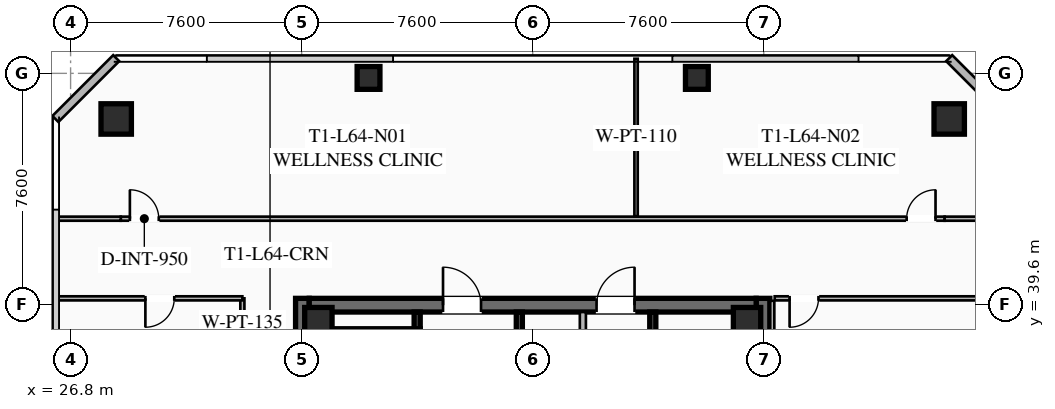
"""IFC4 building model, lengths in metres.
Left out: names, types, materials, properties, quantities, classifications, styles, units other than length and angle.
Written with IfcOpenShell. Run it as: python <this file> out.ifc"""

import sys

from ifc_helpers import new_model, si_unit, direction, frame, frame_2d, origin, origin_2d, place, context, subcontext, project, spatial, rectangle, hollow_rectangle, extrude, element, fill, save


model = new_model("IFC4")
c1 = context("Model", 3, precision=1e-05, world=origin(), true_north=direction((0.0, 1.0)))
c2 = subcontext(c1, "Body", "Model", "MODEL_VIEW")
j1 = project(units=[si_unit("LENGTHUNIT", "METRE"), si_unit("PLANEANGLEUNIT", "RADIAN")], contexts=[c1])
p1 = place(None, origin())
s1 = spatial("IfcSite", under=j1, at=p1, CompositionType="ELEMENT")
p2 = place(p1, origin())
s2 = spatial("IfcBuilding", under=s1, at=p2, CompositionType="ELEMENT")
p3 = place(p2, frame((0.0, 0.0, 236.15)))
s3 = spatial("IfcBuildingStorey", under=s2, at=p3, CompositionType="ELEMENT", Elevation=236.15)
for number, where, z_axis, x_axis in (
    (1, (34.425, 24.2, 0.0), (0.0, 0.0, 1.0), (0.0, 1.0, 0.0)),
    (2, (49.575, 39.8, 0.0), (0.0, 0.0, 1.0), (0.0, -1.0, 0.0)),
):
    element("IfcWall", number, at=place(p3, frame(where, z_axis=z_axis, x_axis=x_axis)), inside=s3, PredefinedType="SHEAR", context=c2, shape_type="SweptSolid", body=[
        extrude(rectangle(XDim=15.6, YDim=0.45, at=frame_2d((7.8, 0.0))), origin(), (0.0, 0.0, 1.0), 3.55),
    ])
p4 = place(p3, frame((34.65, 39.575, 0.0), z_axis=(0.0, 0.0, 1.0), x_axis=(1.0, 0.0, 0.0)))
e3 = element("IfcWall", 3, at=p4, inside=s3, PredefinedType="SHEAR", context=c2, shape_type="SweptSolid", body=[
    extrude(rectangle(XDim=14.7, YDim=0.45, at=frame_2d((7.35, 0.0))), origin(), (0.0, 0.0, 1.0), 3.55),
])
p5 = place(p4, frame((4.4, 0.0, 0.0)))
e4 = element("IfcOpeningElement", 4, at=p5, cuts=e3, PredefinedType="OPENING", context=c2, shape_type="SweptSolid", body=[
    extrude(rectangle(XDim=1.25, YDim=2.25, at=frame_2d((0.625, 1.125))), frame((0.0, 0.235, 0.0), z_axis=(0.0, -1.0, 0.0), x_axis=(1.0, 0.0, 0.0)), (0.0, 0.0, 1.0), 0.47),
])
p6 = place(p4, frame((9.45, 0.0, 0.0)))
e5 = element("IfcOpeningElement", 5, at=p6, cuts=e3, PredefinedType="OPENING", context=c2, shape_type="SweptSolid", body=[
    extrude(rectangle(XDim=1.25, YDim=2.25, at=frame_2d((0.625, 1.125))), frame((0.0, 0.235, 0.0), z_axis=(0.0, -1.0, 0.0), x_axis=(1.0, 0.0, 0.0)), (0.0, 0.0, 1.0), 0.47),
])
for number, where, z_axis, x_axis in (
    (6, (49.05, 39.05, 0.0), (0.0, 0.0, 1.0), (1.0, 0.0, 0.0)),
    (7, (34.95, 39.05, 0.0), (0.0, 0.0, 1.0), (1.0, 0.0, 0.0)),
):
    element("IfcColumn", number, at=place(p3, frame(where, z_axis=z_axis, x_axis=x_axis)), inside=s3, PredefinedType="COLUMN", context=c2, shape_type="SweptSolid", body=[
        extrude(hollow_rectangle(XDim=0.9, YDim=0.9, WallThickness=0.04, at=origin_2d()), origin(), (0.0, 0.0, 1.0), 3.37),
    ])
for number, where, z_axis, x_axis in (
    (8, (55.7, 45.7, 0.0), (0.0, 0.0, 1.0), (1.0, 0.0, 0.0)),
    (9, (28.3, 45.7, 0.0), (0.0, 0.0, 1.0), (1.0, 0.0, 0.0)),
):
    element("IfcColumn", number, at=place(p3, frame(where, z_axis=z_axis, x_axis=x_axis)), inside=s3, PredefinedType="COLUMN", context=c2, shape_type="SweptSolid", body=[
        extrude(hollow_rectangle(XDim=1.0, YDim=1.0, WallThickness=0.04, at=origin_2d()), origin(), (0.0, 0.0, 1.0), 3.37),
    ])
for number, where, z_axis, x_axis in (
    (10, (47.4, 47.05, 0.0), (0.0, 0.0, 1.0), (1.0, 0.0, 0.0)),
    (11, (36.6, 47.05, 0.0), (0.0, 0.0, 1.0), (1.0, 0.0, 0.0)),
):
    element("IfcColumn", number, at=place(p3, frame(where, z_axis=z_axis, x_axis=x_axis)), inside=s3, PredefinedType="COLUMN", context=c2, shape_type="SweptSolid", body=[
        extrude(hollow_rectangle(XDim=0.75, YDim=0.75, WallThickness=0.032, at=origin_2d()), origin(), (0.0, 0.0, 1.0), 3.37),
    ])
for number, where, z_axis, x_axis in (
    (12, (26.3, 45.7, 0.0), (0.0, 0.0, 1.0), (0.707, 0.707, 0.0)),
    (13, (55.7, 47.7, 0.0), (0.0, 0.0, 1.0), (0.707, -0.707, 0.0)),
):
    element("IfcWall", number, at=place(p3, frame(where, z_axis=z_axis, x_axis=x_axis)), inside=s3, PredefinedType="SOLIDWALL", context=c2, shape_type="SweptSolid", body=[
        extrude(rectangle(XDim=2.828, YDim=0.28, at=frame_2d((1.414, 0.0))), origin(), (0.0, 0.0, 1.0), 3.37),
    ])
p7 = place(p3, frame((38.2, 31.2, 0.0), z_axis=(0.0, 0.0, 1.0), x_axis=(0.0, 1.0, 0.0)))
e14 = element("IfcWall", 14, at=p7, inside=s3, PredefinedType="SHEAR", context=c2, shape_type="SweptSolid", body=[
    extrude(rectangle(XDim=8.15, YDim=0.2, at=frame_2d((4.075, 0.0))), origin(), (0.0, 0.0, 1.0), 3.37),
])
p8 = place(p7, frame((0.45, 0.0, 0.0)))
e15 = element("IfcOpeningElement", 15, at=p8, cuts=e14, PredefinedType="OPENING", context=c2, shape_type="SweptSolid", body=[
    extrude(rectangle(XDim=1.15, YDim=2.2, at=frame_2d((0.575, 1.1))), frame((0.0, 0.11, 0.0), z_axis=(0.0, -1.0, 0.0), x_axis=(1.0, 0.0, 0.0)), (0.0, 0.0, 1.0), 0.22),
])
p9 = place(p3, frame((41.56, 24.65, 0.0), z_axis=(0.0, 0.0, 1.0), x_axis=(0.0, 1.0, 0.0)))
e16 = element("IfcWall", 16, at=p9, inside=s3, PredefinedType="SHEAR", context=c2, shape_type="SweptSolid", body=[
    extrude(rectangle(XDim=14.7, YDim=0.2, at=frame_2d((7.35, 0.0))), origin(), (0.0, 0.0, 1.0), 3.37),
])
p10 = place(p3, frame((45.95, 39.35, 0.0), z_axis=(0.0, 0.0, 1.0), x_axis=(0.0, -1.0, 0.0)))
e17 = element("IfcWall", 17, at=p10, inside=s3, PredefinedType="SHEAR", context=c2, shape_type="SweptSolid", body=[
    extrude(rectangle(XDim=6.55, YDim=0.2, at=frame_2d((3.275, 0.0))), origin(), (0.0, 0.0, 1.0), 3.37),
])
p11 = place(p10, frame((5.075, 0.0, 0.0)))
e18 = element("IfcOpeningElement", 18, at=p11, cuts=e17, PredefinedType="OPENING", context=c2, shape_type="SweptSolid", body=[
    extrude(rectangle(XDim=1.1, YDim=2.2, at=frame_2d((0.55, 1.1))), frame((0.0, 0.11, 0.0), z_axis=(0.0, -1.0, 0.0), x_axis=(1.0, 0.0, 0.0)), (0.0, 0.0, 1.0), 0.22),
])
p12 = place(p10, frame((3.025, 0.0, 0.0)))
e19 = element("IfcOpeningElement", 19, at=p12, cuts=e17, PredefinedType="OPENING", context=c2, shape_type="SweptSolid", body=[
    extrude(rectangle(XDim=1.1, YDim=2.2, at=frame_2d((0.55, 1.1))), frame((0.0, 0.11, 0.0), z_axis=(0.0, -1.0, 0.0), x_axis=(1.0, 0.0, 0.0)), (0.0, 0.0, 1.0), 0.22),
])
p13 = place(p10, frame((1.025, 0.0, 0.0)))
e20 = element("IfcOpeningElement", 20, at=p13, cuts=e17, PredefinedType="OPENING", context=c2, shape_type="SweptSolid", body=[
    extrude(rectangle(XDim=1.1, YDim=2.2, at=frame_2d((0.55, 1.1))), frame((0.0, 0.11, 0.0), z_axis=(0.0, -1.0, 0.0), x_axis=(1.0, 0.0, 0.0)), (0.0, 0.0, 1.0), 0.22),
])
p14 = place(p3, frame((43.65, 32.35, 0.0), z_axis=(0.0, 0.0, 1.0), x_axis=(0.0, 1.0, 0.0)))
e21 = element("IfcWall", 21, at=p14, inside=s3, PredefinedType="SOLIDWALL", context=c2, shape_type="SweptSolid", body=[
    extrude(rectangle(XDim=7.0, YDim=0.2, at=frame_2d((3.5, 0.0))), origin(), (0.0, 0.0, 1.0), 2.723),
])
p15 = place(p14, frame((0.85, 0.0, 0.0)))
e22 = element("IfcOpeningElement", 22, at=p15, cuts=e21, PredefinedType="OPENING", context=c2, shape_type="SweptSolid", body=[
    extrude(rectangle(XDim=0.95, YDim=2.05, at=frame_2d((0.475, 1.025))), frame((0.0, 0.11, 0.0), z_axis=(0.0, -1.0, 0.0), x_axis=(1.0, 0.0, 0.0)), (0.0, 0.0, 1.0), 0.22),
])
p16 = place(p14, frame((4.85, 0.0, 0.0)))
e23 = element("IfcOpeningElement", 23, at=p16, cuts=e21, PredefinedType="OPENING", context=c2, shape_type="SweptSolid", body=[
    extrude(rectangle(XDim=0.95, YDim=2.05, at=frame_2d((0.475, 1.025))), frame((0.0, 0.11, 0.0), z_axis=(0.0, -1.0, 0.0), x_axis=(1.0, 0.0, 0.0)), (0.0, 0.0, 1.0), 0.22),
])
p17 = place(p3, frame((32.45, 35.4, 0.0), z_axis=(0.0, 0.0, 1.0), x_axis=(0.0, 1.0, 0.0)))
e24 = element("IfcWall", 24, at=p17, inside=s3, PredefinedType="PARTITIONING", context=c2, shape_type="SweptSolid", body=[
    extrude(rectangle(XDim=4.4, YDim=0.135, at=frame_2d((2.2, 0.0))), origin(), (0.0, 0.0, 1.0), 2.723),
])
p18 = place(p3, frame((28.45, 42.42, 0.0), z_axis=(0.0, 0.0, 1.0), x_axis=(1.0, 0.0, 0.0)))
e25 = element("IfcWall", 25, at=p18, inside=s3, PredefinedType="PARTITIONING", context=c2, shape_type="SweptSolid", body=[
    extrude(rectangle(XDim=27.1, YDim=0.135, at=frame_2d((13.55, 0.0))), origin(), (0.0, 0.0, 1.0), 2.723),
])
p19 = place(p18, frame((0.3, 0.0, 0.0)))
e26 = element("IfcOpeningElement", 26, at=p19, cuts=e25, PredefinedType="OPENING", context=c2, shape_type="SweptSolid", body=[
    extrude(rectangle(XDim=0.95, YDim=2.05, at=frame_2d((0.475, 1.025))), frame((0.0, 0.077, 0.0), z_axis=(0.0, -1.0, 0.0), x_axis=(1.0, 0.0, 0.0)), (0.0, 0.0, 1.0), 0.155),
])
p20 = place(p18, frame((25.85, 0.0, 0.0)))
e27 = element("IfcOpeningElement", 27, at=p20, cuts=e25, PredefinedType="OPENING", context=c2, shape_type="SweptSolid", body=[
    extrude(rectangle(XDim=0.95, YDim=2.05, at=frame_2d((0.475, 1.025))), frame((0.0, 0.077, 0.0), z_axis=(0.0, -1.0, 0.0), x_axis=(1.0, 0.0, 0.0)), (0.0, 0.0, 1.0), 0.155),
])
for number, where, z_axis, x_axis in (
    (28, (26.32, 42.42, 0.0), (0.0, 0.0, 1.0), (1.0, 0.0, 0.0)),
    (29, (55.55, 42.42, 0.0), (0.0, 0.0, 1.0), (1.0, 0.0, 0.0)),
):
    element("IfcWall", number, at=place(p3, frame(where, z_axis=z_axis, x_axis=x_axis)), inside=s3, PredefinedType="PARTITIONING", context=c2, shape_type="SweptSolid", body=[
        extrude(rectangle(XDim=2.13, YDim=0.135, at=frame_2d((1.065, 0.0))), origin(), (0.0, 0.0, 1.0), 2.723),
    ])
p21 = place(p3, frame((45.4, 42.5, 0.0), z_axis=(0.0, 0.0, 1.0), x_axis=(0.0, 1.0, 0.0)))
e30 = element("IfcWall", 30, at=p21, inside=s3, PredefinedType="PARTITIONING", context=c2, shape_type="SweptSolid", body=[
    extrude(rectangle(XDim=5.18, YDim=0.11, at=frame_2d((2.59, 0.0))), origin(), (0.0, 0.0, 1.0), 2.723),
])
p22 = place(p3, frame((49.88, 39.72, 0.0), z_axis=(0.0, 0.0, 1.0), x_axis=(0.0, -1.0, 0.0)))
e31 = element("IfcWall", 31, at=p22, inside=s3, PredefinedType="PARTITIONING", context=c2, shape_type="SweptSolid", body=[
    extrude(rectangle(XDim=15.44, YDim=0.135, at=frame_2d((7.72, 0.0))), origin(), (0.0, 0.0, 1.0), 2.723),
])
p23 = place(p3, frame((57.68, 39.8, 0.0), z_axis=(0.0, 0.0, 1.0), x_axis=(-1.0, 0.0, 0.0)))
e32 = element("IfcWall", 32, at=p23, inside=s3, PredefinedType="PARTITIONING", context=c2, shape_type="SweptSolid", body=[
    extrude(rectangle(XDim=7.72, YDim=0.135, at=frame_2d((3.86, 0.0))), origin(), (0.0, 0.0, 1.0), 2.723),
])
p24 = place(p23, frame((6.28, 0.0, 0.0)))
e33 = element("IfcOpeningElement", 33, at=p24, cuts=e32, PredefinedType="OPENING", context=c2, shape_type="SweptSolid", body=[
    extrude(rectangle(XDim=0.95, YDim=2.05, at=frame_2d((0.475, 1.025))), frame((0.0, 0.077, 0.0), z_axis=(0.0, -1.0, 0.0), x_axis=(1.0, 0.0, 0.0)), (0.0, 0.0, 1.0), 0.155),
])
p25 = place(p3, frame((32.45, 39.8, 0.0), z_axis=(0.0, 0.0, 1.0), x_axis=(-1.0, 0.0, 0.0)))
e34 = element("IfcWall", 34, at=p25, inside=s3, PredefinedType="PARTITIONING", context=c2, shape_type="SweptSolid", body=[
    extrude(rectangle(XDim=6.13, YDim=0.135, at=frame_2d((3.065, 0.0))), origin(), (0.0, 0.0, 1.0), 2.723),
])
p26 = place(p25, frame((2.24, 0.0, 0.0)))
e35 = element("IfcOpeningElement", 35, at=p26, cuts=e34, PredefinedType="OPENING", context=c2, shape_type="SweptSolid", body=[
    extrude(rectangle(XDim=0.95, YDim=2.05, at=frame_2d((0.475, 1.025))), frame((0.0, 0.077, 0.0), z_axis=(0.0, -1.0, 0.0), x_axis=(1.0, 0.0, 0.0)), (0.0, 0.0, 1.0), 0.155),
])
p27 = place(p5, origin())
e36 = element("IfcDoor", 36, at=p27, inside=s3, OperationType="SINGLE_SWING_LEFT", PredefinedType="DOOR", context=c2, shape_type="SweptSolid", body=[
    extrude(rectangle(XDim=1.25, YDim=2.25, at=frame_2d((0.625, 1.125))), frame((0.0, 0.025, 0.0), z_axis=(0.0, -1.0, 0.0), x_axis=(1.0, 0.0, 0.0)), (0.0, 0.0, 1.0), 0.05),
])
fill(e4, e36)
p28 = place(p6, origin())
e37 = element("IfcDoor", 37, at=p28, inside=s3, OperationType="SINGLE_SWING_RIGHT", PredefinedType="DOOR", context=c2, shape_type="SweptSolid", body=[
    extrude(rectangle(XDim=1.25, YDim=2.25, at=frame_2d((0.625, 1.125))), frame((0.0, 0.025, 0.0), z_axis=(0.0, -1.0, 0.0), x_axis=(1.0, 0.0, 0.0)), (0.0, 0.0, 1.0), 0.05),
])
fill(e5, e37)
p29 = place(p19, origin())
e38 = element("IfcDoor", 38, at=p29, inside=s3, OperationType="SINGLE_SWING_LEFT", PredefinedType="DOOR", context=c2, shape_type="SweptSolid", body=[
    extrude(rectangle(XDim=0.95, YDim=2.05, at=frame_2d((0.475, 1.025))), frame((0.0, 0.025, 0.0), z_axis=(0.0, -1.0, 0.0), x_axis=(1.0, 0.0, 0.0)), (0.0, 0.0, 1.0), 0.05),
])
fill(e26, e38)
p30 = place(p20, origin())
e39 = element("IfcDoor", 39, at=p30, inside=s3, OperationType="SINGLE_SWING_RIGHT", PredefinedType="DOOR", context=c2, shape_type="SweptSolid", body=[
    extrude(rectangle(XDim=0.95, YDim=2.05, at=frame_2d((0.475, 1.025))), frame((0.0, 0.025, 0.0), z_axis=(0.0, -1.0, 0.0), x_axis=(1.0, 0.0, 0.0)), (0.0, 0.0, 1.0), 0.05),
])
fill(e27, e39)
p31 = place(p24, origin())
e40 = element("IfcDoor", 40, at=p31, inside=s3, OperationType="SINGLE_SWING_RIGHT", PredefinedType="DOOR", context=c2, shape_type="SweptSolid", body=[
    extrude(rectangle(XDim=0.95, YDim=2.05, at=frame_2d((0.475, 1.025))), frame((0.0, 0.025, 0.0), z_axis=(0.0, -1.0, 0.0), x_axis=(1.0, 0.0, 0.0)), (0.0, 0.0, 1.0), 0.05),
])
fill(e33, e40)
p32 = place(p26, origin())
e41 = element("IfcDoor", 41, at=p32, inside=s3, OperationType="SINGLE_SWING_RIGHT", PredefinedType="DOOR", context=c2, shape_type="SweptSolid", body=[
    extrude(rectangle(XDim=0.95, YDim=2.05, at=frame_2d((0.475, 1.025))), frame((0.0, 0.025, 0.0), z_axis=(0.0, -1.0, 0.0), x_axis=(1.0, 0.0, 0.0)), (0.0, 0.0, 1.0), 0.05),
])
fill(e35, e41)
save(model, sys.argv[1])
